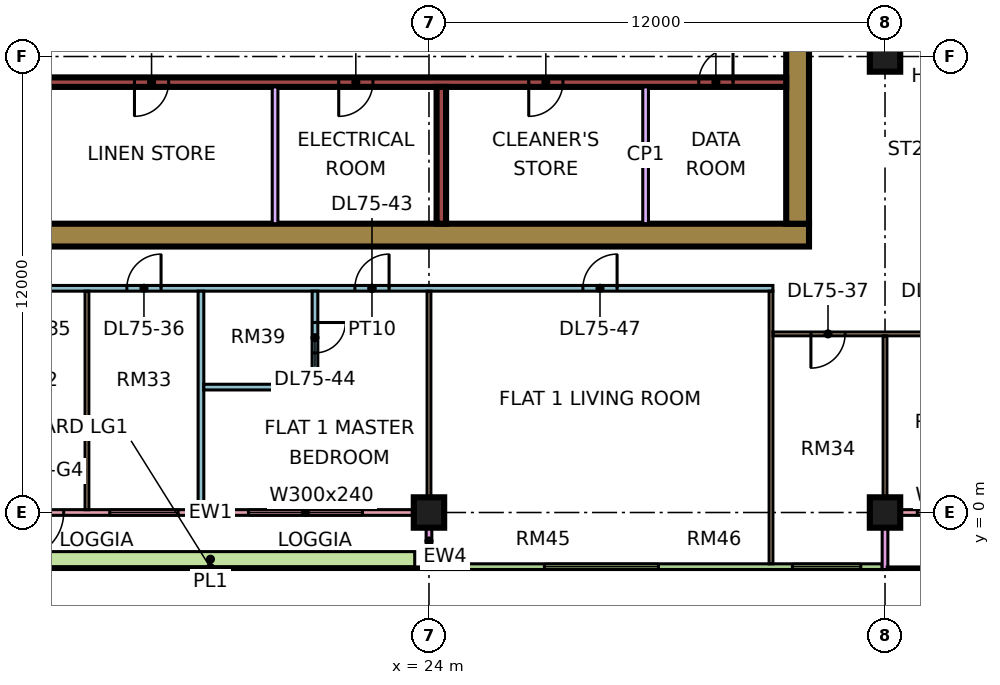
"""IFC4 building model, lengths in metres.
Left out: names, types, materials, properties, quantities, classifications, styles, units other than length and angle.
Written with IfcOpenShell. Run it as: python <this file> out.ifc"""

import sys

from ifc_helpers import new_model, si_unit, direction, frame, frame_2d, origin, origin_2d, place, context, subcontext, project, spatial, rectangle, extrude, element, fill, save


model = new_model("IFC4")
c1 = context("Model", 3, precision=1e-05, world=origin(), true_north=direction((0.0, 1.0)))
c2 = subcontext(c1, "Body", "Model", "MODEL_VIEW")
j1 = project(units=[si_unit("LENGTHUNIT", "METRE"), si_unit("PLANEANGLEUNIT", "RADIAN")], contexts=[c1])
p1 = place(None, origin())
s1 = spatial("IfcSite", under=j1, at=p1, CompositionType="ELEMENT")
p2 = place(p1, origin())
s2 = spatial("IfcBuilding", under=s1, at=p2, CompositionType="ELEMENT")
p3 = place(p2, frame((0.0, 0.0, 318.4)))
s3 = spatial("IfcBuildingStorey", under=s2, at=p3, CompositionType="ELEMENT", Elevation=318.4)
for number, where, z_axis, x_axis in (
    (1, (24.0, 0.0, 0.0), (0.0, 0.0, 1.0), (1.0, 0.0, 0.0)),
    (2, (36.0, 0.0, 0.0), (0.0, 0.0, 1.0), (1.0, 0.0, 0.0)),
    (3, (36.0, 12.0, 0.0), (0.0, 0.0, 1.0), (1.0, 0.0, 0.0)),
):
    element("IfcColumn", number, at=place(p3, frame(where, z_axis=z_axis, x_axis=x_axis)), inside=s3, PredefinedType="COLUMN", context=c2, shape_type="SweptSolid", body=[
        extrude(rectangle(XDim=0.8, YDim=0.8, at=origin_2d()), origin(), (0.0, 0.0, 1.0), 3.75),
    ])
p4 = place(p3, frame((9.0, 7.3, 0.0), z_axis=(0.0, 0.0, 1.0), x_axis=(1.0, 0.0, 0.0)))
e4 = element("IfcWall", 4, at=p4, inside=s3, PredefinedType="SHEAR", context=c2, shape_type="SweptSolid", body=[
    extrude(rectangle(XDim=25.0, YDim=0.6, at=frame_2d((12.5, 0.0))), origin(), (0.0, 0.0, 1.0), 3.75),
])
p5 = place(p3, frame((33.7, 7.6, 0.0), z_axis=(0.0, 0.0, 1.0), x_axis=(0.0, 1.0, 0.0)))
e5 = element("IfcWall", 5, at=p5, inside=s3, PredefinedType="SHEAR", context=c2, shape_type="SweptSolid", body=[
    extrude(rectangle(XDim=11.8, YDim=0.6, at=frame_2d((5.9, 0.0))), origin(), (0.0, 0.0, 1.0), 3.75),
])
p6 = place(p5, frame((5.6, 0.0, 0.0)))
e6 = element("IfcOpeningElement", 6, at=p6, cuts=e5, PredefinedType="OPENING", context=c2, shape_type="SweptSolid", body=[
    extrude(rectangle(XDim=1.8, YDim=2.4, at=frame_2d((0.9, 1.2))), frame((0.0, 0.31, 0.0), z_axis=(0.0, -1.0, 0.0), x_axis=(1.0, 0.0, 0.0)), (0.0, 0.0, 1.0), 0.62),
])
p7 = place(p3, frame((13.45, 11.325, 0.0), z_axis=(0.0, 0.0, 1.0), x_axis=(1.0, 0.0, 0.0)))
e7 = element("IfcWall", 7, at=p7, inside=s3, PredefinedType="SHEAR", context=c2, shape_type="SweptSolid", body=[
    extrude(rectangle(XDim=19.95, YDim=0.25, at=frame_2d((9.975, 0.0))), origin(), (0.0, 0.0, 1.0), 3.75),
])
p8 = place(p7, frame((2.8, 0.0, 0.0)))
e8 = element("IfcOpeningElement", 8, at=p8, cuts=e7, PredefinedType="OPENING", context=c2, shape_type="SweptSolid", body=[
    extrude(rectangle(XDim=0.9, YDim=2.1, at=frame_2d((0.45, 1.05))), frame((0.0, 0.135, 0.0), z_axis=(0.0, -1.0, 0.0), x_axis=(1.0, 0.0, 0.0)), (0.0, 0.0, 1.0), 0.27),
])
p9 = place(p7, frame((8.175, 0.0, 0.0)))
e9 = element("IfcOpeningElement", 9, at=p9, cuts=e7, PredefinedType="OPENING", context=c2, shape_type="SweptSolid", body=[
    extrude(rectangle(XDim=0.9, YDim=2.1, at=frame_2d((0.45, 1.05))), frame((0.0, 0.135, 0.0), z_axis=(0.0, -1.0, 0.0), x_axis=(1.0, 0.0, 0.0)), (0.0, 0.0, 1.0), 0.27),
])
p10 = place(p7, frame((13.175, 0.0, 0.0)))
e10 = element("IfcOpeningElement", 10, at=p10, cuts=e7, PredefinedType="OPENING", context=c2, shape_type="SweptSolid", body=[
    extrude(rectangle(XDim=0.9, YDim=2.1, at=frame_2d((0.45, 1.05))), frame((0.0, 0.135, 0.0), z_axis=(0.0, -1.0, 0.0), x_axis=(1.0, 0.0, 0.0)), (0.0, 0.0, 1.0), 0.27),
])
p11 = place(p7, frame((17.65, 0.0, 0.0)))
e11 = element("IfcOpeningElement", 11, at=p11, cuts=e7, PredefinedType="OPENING", context=c2, shape_type="SweptSolid", body=[
    extrude(rectangle(XDim=0.9, YDim=2.1, at=frame_2d((0.45, 1.05))), frame((0.0, 0.135, 0.0), z_axis=(0.0, -1.0, 0.0), x_axis=(1.0, 0.0, 0.0)), (0.0, 0.0, 1.0), 0.27),
])
p12 = place(p3, frame((24.325, 7.6, 0.0), z_axis=(0.0, 0.0, 1.0), x_axis=(0.0, 1.0, 0.0)))
e12 = element("IfcWall", 12, at=p12, inside=s3, PredefinedType="SHEAR", context=c2, shape_type="SweptSolid", body=[
    extrude(rectangle(XDim=3.6, YDim=0.25, at=frame_2d((1.8, 0.0))), origin(), (0.0, 0.0, 1.0), 3.75),
])
p13 = place(p3, frame((12.575, 0.0, 0.0), z_axis=(0.0, 0.0, 1.0), x_axis=(1.0, 0.0, 0.0)))
e13 = element("IfcWall", 13, at=p13, inside=s3, PredefinedType="SOLIDWALL", context=c2, shape_type="SweptSolid", body=[
    extrude(rectangle(XDim=11.35, YDim=0.15, at=frame_2d((5.675, 0.0))), origin(), (0.0, 0.0, 1.0), 3.3),
])
p14 = place(p13, frame((0.613, 0.0, 0.0)))
e14 = element("IfcOpeningElement", 14, at=p14, cuts=e13, PredefinedType="OPENING", context=c2, shape_type="SweptSolid", body=[
    extrude(rectangle(XDim=1.2, YDim=2.4, at=frame_2d((0.6, 1.2))), frame((0.0, 0.085, 0.0), z_axis=(0.0, -1.0, 0.0), x_axis=(1.0, 0.0, 0.0)), (0.0, 0.0, 1.0), 0.17),
])
p15 = place(p13, frame((3.025, 0.0, 0.45)))
e15 = element("IfcOpeningElement", 15, at=p15, cuts=e13, PredefinedType="OPENING", context=c2, shape_type="SweptSolid", body=[
    extrude(rectangle(XDim=1.8, YDim=2.4, at=frame_2d((0.9, 1.2))), frame((0.0, 0.085, 0.0), z_axis=(0.0, -1.0, 0.0), x_axis=(1.0, 0.0, 0.0)), (0.0, 0.0, 1.0), 0.17),
])
p16 = place(p13, frame((6.675, 0.0, 0.45)))
e16 = element("IfcOpeningElement", 16, at=p16, cuts=e13, PredefinedType="OPENING", context=c2, shape_type="SweptSolid", body=[
    extrude(rectangle(XDim=3.0, YDim=2.4, at=frame_2d((1.5, 1.2))), frame((0.0, 0.085, 0.0), z_axis=(0.0, -1.0, 0.0), x_axis=(1.0, 0.0, 0.0)), (0.0, 0.0, 1.0), 0.17),
])
p17 = place(p3, frame((24.0, -1.5, 0.0), z_axis=(0.0, 0.0, 1.0), x_axis=(0.0, 1.0, 0.0)))
e17 = element("IfcWall", 17, at=p17, inside=s3, PredefinedType="SOLIDWALL", context=c2, shape_type="SweptSolid", body=[
    extrude(rectangle(XDim=1.5, YDim=0.15, at=frame_2d((0.75, 0.0))), origin(), (0.0, 0.0, 1.0), 3.3),
])
p18 = place(p3, frame((24.075, -1.425, 0.0), z_axis=(0.0, 0.0, 1.0), x_axis=(1.0, 0.0, 0.0)))
e18 = element("IfcWall", 18, at=p18, inside=s3, PredefinedType="SOLIDWALL", context=c2, shape_type="SweptSolid", body=[
    extrude(rectangle(XDim=11.85, YDim=0.15, at=frame_2d((5.925, 0.0))), origin(), (0.0, 0.0, 1.0), 3.3),
])
p19 = place(p18, frame((2.962, 0.0, 0.45)))
e19 = element("IfcOpeningElement", 19, at=p19, cuts=e18, PredefinedType="OPENING", context=c2, shape_type="SweptSolid", body=[
    extrude(rectangle(XDim=3.0, YDim=2.4, at=frame_2d((1.5, 1.2))), frame((0.0, 0.085, 0.0), z_axis=(0.0, -1.0, 0.0), x_axis=(1.0, 0.0, 0.0)), (0.0, 0.0, 1.0), 0.17),
])
p20 = place(p18, frame((9.488, 0.0, 0.45)))
e20 = element("IfcOpeningElement", 20, at=p20, cuts=e18, PredefinedType="OPENING", context=c2, shape_type="SweptSolid", body=[
    extrude(rectangle(XDim=1.8, YDim=2.4, at=frame_2d((0.9, 1.2))), frame((0.0, 0.085, 0.0), z_axis=(0.0, -1.0, 0.0), x_axis=(1.0, 0.0, 0.0)), (0.0, 0.0, 1.0), 0.17),
])
p21 = place(p3, frame((36.075, 0.0, 0.0), z_axis=(0.0, 0.0, 1.0), x_axis=(1.0, 0.0, 0.0)))
e21 = element("IfcWall", 21, at=p21, inside=s3, PredefinedType="SOLIDWALL", context=c2, shape_type="SweptSolid", body=[
    extrude(rectangle(XDim=11.85, YDim=0.15, at=frame_2d((5.925, 0.0))), origin(), (0.0, 0.0, 1.0), 3.3),
])
p22 = place(p21, frame((0.775, 0.0, 0.45)))
e22 = element("IfcOpeningElement", 22, at=p22, cuts=e21, PredefinedType="OPENING", context=c2, shape_type="SweptSolid", body=[
    extrude(rectangle(XDim=1.8, YDim=2.4, at=frame_2d((0.9, 1.2))), frame((0.0, 0.085, 0.0), z_axis=(0.0, -1.0, 0.0), x_axis=(1.0, 0.0, 0.0)), (0.0, 0.0, 1.0), 0.17),
])
p23 = place(p21, frame((4.775, 0.0, 0.0)))
e23 = element("IfcOpeningElement", 23, at=p23, cuts=e21, PredefinedType="OPENING", context=c2, shape_type="SweptSolid", body=[
    extrude(rectangle(XDim=1.8, YDim=2.4, at=frame_2d((0.9, 1.2))), frame((0.0, 0.085, 0.0), z_axis=(0.0, -1.0, 0.0), x_axis=(1.0, 0.0, 0.0)), (0.0, 0.0, 1.0), 0.17),
])
p24 = place(p21, frame((10.038, 0.0, 0.45)))
e24 = element("IfcOpeningElement", 24, at=p24, cuts=e21, PredefinedType="OPENING", context=c2, shape_type="SweptSolid", body=[
    extrude(rectangle(XDim=1.2, YDim=2.4, at=frame_2d((0.6, 1.2))), frame((0.0, 0.085, 0.0), z_axis=(0.0, -1.0, 0.0), x_axis=(1.0, 0.0, 0.0)), (0.0, 0.0, 1.0), 0.17),
])
p25 = place(p3, frame((36.0, -1.5, 0.0), z_axis=(0.0, 0.0, 1.0), x_axis=(0.0, 1.0, 0.0)))
e25 = element("IfcWall", 25, at=p25, inside=s3, PredefinedType="SOLIDWALL", context=c2, shape_type="SweptSolid", body=[
    extrude(rectangle(XDim=1.5, YDim=0.15, at=frame_2d((0.75, 0.0))), origin(), (0.0, 0.0, 1.0), 3.3),
])
p26 = place(p3, frame((12.875, -1.229, 0.0), z_axis=(0.0, 0.0, 1.0), x_axis=(1.0, 0.0, 0.0)))
e26 = element("IfcWall", 26, at=p26, inside=s3, PredefinedType="SOLIDWALL", context=c2, shape_type="SweptSolid", body=[
    extrude(rectangle(XDim=10.75, YDim=0.4, at=frame_2d((5.375, 0.0))), origin(), (0.0, 0.0, 1.0), 0.7),
])
for number, where, z_axis, x_axis in (
    (27, (19.95, 7.6, 0.0), (0.0, 0.0, 1.0), (0.0, 1.0, 0.0)),
    (28, (29.7, 7.6, 0.0), (0.0, 0.0, 1.0), (0.0, 1.0, 0.0)),
):
    element("IfcWall", number, at=place(p3, frame(where, z_axis=z_axis, x_axis=x_axis)), inside=s3, PredefinedType="PARTITIONING", context=c2, shape_type="SweptSolid", body=[
        extrude(rectangle(XDim=3.6, YDim=0.15, at=frame_2d((1.8, 0.0))), origin(), (0.0, 0.0, 1.0), 3.3),
    ])
p27 = place(p3, frame((11.95, 5.9, 0.0), z_axis=(0.0, 0.0, 1.0), x_axis=(1.0, 0.0, 0.0)))
e29 = element("IfcWall", 29, at=p27, inside=s3, PredefinedType="PARTITIONING", context=c2, shape_type="SweptSolid", body=[
    extrude(rectangle(XDim=21.1, YDim=0.15, at=frame_2d((10.55, 0.0))), origin(), (0.0, 0.0, 1.0), 3.3),
])
p28 = place(p27, frame((1.1, 0.0, 0.0)))
e30 = element("IfcOpeningElement", 30, at=p28, cuts=e29, PredefinedType="OPENING", context=c2, shape_type="SweptSolid", body=[
    extrude(rectangle(XDim=0.9, YDim=2.1, at=frame_2d((0.45, 1.05))), frame((0.0, 0.085, 0.0), z_axis=(0.0, -1.0, 0.0), x_axis=(1.0, 0.0, 0.0)), (0.0, 0.0, 1.0), 0.17),
])
p29 = place(p27, frame((4.1, 0.0, 0.0)))
e31 = element("IfcOpeningElement", 31, at=p29, cuts=e29, PredefinedType="OPENING", context=c2, shape_type="SweptSolid", body=[
    extrude(rectangle(XDim=0.9, YDim=2.1, at=frame_2d((0.45, 1.05))), frame((0.0, 0.085, 0.0), z_axis=(0.0, -1.0, 0.0), x_axis=(1.0, 0.0, 0.0)), (0.0, 0.0, 1.0), 0.17),
])
p30 = place(p27, frame((10.1, 0.0, 0.0)))
e32 = element("IfcOpeningElement", 32, at=p30, cuts=e29, PredefinedType="OPENING", context=c2, shape_type="SweptSolid", body=[
    extrude(rectangle(XDim=0.9, YDim=2.1, at=frame_2d((0.45, 1.05))), frame((0.0, 0.085, 0.0), z_axis=(0.0, -1.0, 0.0), x_axis=(1.0, 0.0, 0.0)), (0.0, 0.0, 1.0), 0.17),
])
p31 = place(p27, frame((16.1, 0.0, 0.0)))
e33 = element("IfcOpeningElement", 33, at=p31, cuts=e29, PredefinedType="OPENING", context=c2, shape_type="SweptSolid", body=[
    extrude(rectangle(XDim=0.9, YDim=2.1, at=frame_2d((0.45, 1.05))), frame((0.0, 0.085, 0.0), z_axis=(0.0, -1.0, 0.0), x_axis=(1.0, 0.0, 0.0)), (0.0, 0.0, 1.0), 0.17),
])
p32 = place(p3, frame((15.0, 0.074, 0.0), z_axis=(0.0, 0.0, 1.0), x_axis=(0.0, 1.0, 0.0)))
e34 = element("IfcWall", 34, at=p32, inside=s3, PredefinedType="PARTITIONING", context=c2, shape_type="SweptSolid", body=[
    extrude(rectangle(XDim=5.751, YDim=0.1, at=frame_2d((2.875, 0.0))), origin(), (0.0, 0.0, 1.0), 3.3),
])
p33 = place(p3, frame((18.0, 0.074, 0.0), z_axis=(0.0, 0.0, 1.0), x_axis=(0.0, 1.0, 0.0)))
e35 = element("IfcWall", 35, at=p33, inside=s3, PredefinedType="PARTITIONING", context=c2, shape_type="SweptSolid", body=[
    extrude(rectangle(XDim=5.751, YDim=0.15, at=frame_2d((2.875, 0.0))), origin(), (0.0, 0.0, 1.0), 3.3),
])
p34 = place(p3, frame((18.075, 3.3, 0.0), z_axis=(0.0, 0.0, 1.0), x_axis=(1.0, 0.0, 0.0)))
e36 = element("IfcWall", 36, at=p34, inside=s3, PredefinedType="PARTITIONING", context=c2, shape_type="SweptSolid", body=[
    extrude(rectangle(XDim=3.0, YDim=0.15, at=frame_2d((1.5, 0.0))), origin(), (0.0, 0.0, 1.0), 3.3),
])
p35 = place(p3, frame((21.0, 3.375, 0.0), z_axis=(0.0, 0.0, 1.0), x_axis=(0.0, 1.0, 0.0)))
e37 = element("IfcWall", 37, at=p35, inside=s3, PredefinedType="PARTITIONING", context=c2, shape_type="SweptSolid", body=[
    extrude(rectangle(XDim=2.45, YDim=0.15, at=frame_2d((1.225, 0.0))), origin(), (0.0, 0.0, 1.0), 3.3),
])
p36 = place(p35, frame((0.825, 0.0, 0.0)))
e38 = element("IfcOpeningElement", 38, at=p36, cuts=e37, PredefinedType="OPENING", context=c2, shape_type="SweptSolid", body=[
    extrude(rectangle(XDim=0.8, YDim=2.1, at=frame_2d((0.4, 1.05))), frame((0.0, 0.085, 0.0), z_axis=(0.0, -1.0, 0.0), x_axis=(1.0, 0.0, 0.0)), (0.0, 0.0, 1.0), 0.17),
])
p37 = place(p3, frame((24.0, 0.0, 0.0), z_axis=(0.0, 0.0, 1.0), x_axis=(0.0, 1.0, 0.0)))
e39 = element("IfcWall", 39, at=p37, inside=s3, PredefinedType="PARTITIONING", context=c2, shape_type="SweptSolid", body=[
    extrude(rectangle(XDim=5.825, YDim=0.1, at=frame_2d((2.913, 0.0))), origin(), (0.0, 0.0, 1.0), 3.3),
])
p38 = place(p3, frame((33.0, -1.35, 0.0), z_axis=(0.0, 0.0, 1.0), x_axis=(0.0, 1.0, 0.0)))
e40 = element("IfcWall", 40, at=p38, inside=s3, PredefinedType="PARTITIONING", context=c2, shape_type="SweptSolid", body=[
    extrude(rectangle(XDim=7.175, YDim=0.1, at=frame_2d((3.587, 0.0))), origin(), (0.0, 0.0, 1.0), 3.3),
])
p39 = place(p3, frame((33.05, 4.7, 0.0), z_axis=(0.0, 0.0, 1.0), x_axis=(1.0, 0.0, 0.0)))
e41 = element("IfcWall", 41, at=p39, inside=s3, PredefinedType="PARTITIONING", context=c2, shape_type="SweptSolid", body=[
    extrude(rectangle(XDim=20.85, YDim=0.1, at=frame_2d((10.425, 0.0))), origin(), (0.0, 0.0, 1.0), 3.3),
])
p40 = place(p39, frame((1.0, 0.0, 0.0)))
e42 = element("IfcOpeningElement", 42, at=p40, cuts=e41, PredefinedType="OPENING", context=c2, shape_type="SweptSolid", body=[
    extrude(rectangle(XDim=0.9, YDim=2.1, at=frame_2d((0.45, 1.05))), frame((0.0, 0.06, 0.0), z_axis=(0.0, -1.0, 0.0), x_axis=(1.0, 0.0, 0.0)), (0.0, 0.0, 1.0), 0.12),
])
p41 = place(p39, frame((4.0, 0.0, 0.0)))
e43 = element("IfcOpeningElement", 43, at=p41, cuts=e41, PredefinedType="OPENING", context=c2, shape_type="SweptSolid", body=[
    extrude(rectangle(XDim=0.9, YDim=2.1, at=frame_2d((0.45, 1.05))), frame((0.0, 0.06, 0.0), z_axis=(0.0, -1.0, 0.0), x_axis=(1.0, 0.0, 0.0)), (0.0, 0.0, 1.0), 0.12),
])
p42 = place(p39, frame((16.0, 0.0, 0.0)))
e44 = element("IfcOpeningElement", 44, at=p42, cuts=e41, PredefinedType="OPENING", context=c2, shape_type="SweptSolid", body=[
    extrude(rectangle(XDim=0.9, YDim=2.1, at=frame_2d((0.45, 1.05))), frame((0.0, 0.06, 0.0), z_axis=(0.0, -1.0, 0.0), x_axis=(1.0, 0.0, 0.0)), (0.0, 0.0, 1.0), 0.12),
])
p43 = place(p39, frame((19.0, 0.0, 0.0)))
e45 = element("IfcOpeningElement", 45, at=p43, cuts=e41, PredefinedType="OPENING", context=c2, shape_type="SweptSolid", body=[
    extrude(rectangle(XDim=0.9, YDim=2.1, at=frame_2d((0.45, 1.05))), frame((0.0, 0.06, 0.0), z_axis=(0.0, -1.0, 0.0), x_axis=(1.0, 0.0, 0.0)), (0.0, 0.0, 1.0), 0.12),
])
p44 = place(p39, frame((10.0, 0.0, 0.0)))
e46 = element("IfcOpeningElement", 46, at=p44, cuts=e41, PredefinedType="OPENING", context=c2, shape_type="SweptSolid", body=[
    extrude(rectangle(XDim=0.9, YDim=2.1, at=frame_2d((0.45, 1.05))), frame((0.0, 0.06, 0.0), z_axis=(0.0, -1.0, 0.0), x_axis=(1.0, 0.0, 0.0)), (0.0, 0.0, 1.0), 0.12),
])
p45 = place(p3, frame((36.0, 0.0, 0.0), z_axis=(0.0, 0.0, 1.0), x_axis=(0.0, 1.0, 0.0)))
e47 = element("IfcWall", 47, at=p45, inside=s3, PredefinedType="PARTITIONING", context=c2, shape_type="SweptSolid", body=[
    extrude(rectangle(XDim=4.65, YDim=0.1, at=frame_2d((2.325, 0.0))), origin(), (0.0, 0.0, 1.0), 3.3),
])
p46 = place(p14, frame((1.2, 0.0, 0.0), z_axis=(0.0, 0.0, 1.0), x_axis=(-1.0, 0.0, 0.0)))
e48 = element("IfcDoor", 48, at=p46, inside=s3, OperationType="DOUBLE_DOOR_SINGLE_SWING", PredefinedType="DOOR", context=c2, shape_type="SweptSolid", body=[
    extrude(rectangle(XDim=1.2, YDim=2.4, at=frame_2d((0.6, 1.2))), frame((0.0, 0.025, 0.0), z_axis=(0.0, -1.0, 0.0), x_axis=(1.0, 0.0, 0.0)), (0.0, 0.0, 1.0), 0.05),
])
fill(e14, e48)
p47 = place(p15, origin())
e49 = element("IfcWindow", 49, at=p47, inside=s3, PartitioningType="SINGLE_PANEL", PredefinedType="WINDOW", context=c2, shape_type="SweptSolid", body=[
    extrude(rectangle(XDim=1.8, YDim=2.4, at=frame_2d((0.9, 1.2))), frame((0.0, 0.03, 0.0), z_axis=(0.0, -1.0, 0.0), x_axis=(1.0, 0.0, 0.0)), (0.0, 0.0, 1.0), 0.06),
])
fill(e15, e49)
p48 = place(p16, origin())
e50 = element("IfcWindow", 50, at=p48, inside=s3, PartitioningType="SINGLE_PANEL", PredefinedType="WINDOW", context=c2, shape_type="SweptSolid", body=[
    extrude(rectangle(XDim=3.0, YDim=2.4, at=frame_2d((1.5, 1.2))), frame((0.0, 0.03, 0.0), z_axis=(0.0, -1.0, 0.0), x_axis=(1.0, 0.0, 0.0)), (0.0, 0.0, 1.0), 0.06),
])
fill(e16, e50)
p49 = place(p19, origin())
e51 = element("IfcWindow", 51, at=p49, inside=s3, PartitioningType="SINGLE_PANEL", PredefinedType="WINDOW", context=c2, shape_type="SweptSolid", body=[
    extrude(rectangle(XDim=3.0, YDim=2.4, at=frame_2d((1.5, 1.2))), frame((0.0, 0.03, 0.0), z_axis=(0.0, -1.0, 0.0), x_axis=(1.0, 0.0, 0.0)), (0.0, 0.0, 1.0), 0.06),
])
fill(e19, e51)
p50 = place(p20, origin())
e52 = element("IfcWindow", 52, at=p50, inside=s3, PartitioningType="SINGLE_PANEL", PredefinedType="WINDOW", context=c2, shape_type="SweptSolid", body=[
    extrude(rectangle(XDim=1.8, YDim=2.4, at=frame_2d((0.9, 1.2))), frame((0.0, 0.03, 0.0), z_axis=(0.0, -1.0, 0.0), x_axis=(1.0, 0.0, 0.0)), (0.0, 0.0, 1.0), 0.06),
])
fill(e20, e52)
p51 = place(p22, origin())
e53 = element("IfcWindow", 53, at=p51, inside=s3, PartitioningType="SINGLE_PANEL", PredefinedType="WINDOW", context=c2, shape_type="SweptSolid", body=[
    extrude(rectangle(XDim=1.8, YDim=2.4, at=frame_2d((0.9, 1.2))), frame((0.0, 0.03, 0.0), z_axis=(0.0, -1.0, 0.0), x_axis=(1.0, 0.0, 0.0)), (0.0, 0.0, 1.0), 0.06),
])
fill(e22, e53)
p52 = place(p8, frame((0.9, 0.0, 0.0), z_axis=(0.0, 0.0, 1.0), x_axis=(-1.0, 0.0, 0.0)))
e54 = element("IfcDoor", 54, at=p52, inside=s3, OperationType="SINGLE_SWING_LEFT", PredefinedType="DOOR", context=c2, shape_type="SweptSolid", body=[
    extrude(rectangle(XDim=0.9, YDim=2.1, at=frame_2d((0.45, 1.05))), frame((0.0, 0.025, 0.0), z_axis=(0.0, -1.0, 0.0), x_axis=(1.0, 0.0, 0.0)), (0.0, 0.0, 1.0), 0.05),
])
fill(e8, e54)
p53 = place(p9, frame((0.9, 0.0, 0.0), z_axis=(0.0, 0.0, 1.0), x_axis=(-1.0, 0.0, 0.0)))
e55 = element("IfcDoor", 55, at=p53, inside=s3, OperationType="SINGLE_SWING_LEFT", PredefinedType="DOOR", context=c2, shape_type="SweptSolid", body=[
    extrude(rectangle(XDim=0.9, YDim=2.1, at=frame_2d((0.45, 1.05))), frame((0.0, 0.025, 0.0), z_axis=(0.0, -1.0, 0.0), x_axis=(1.0, 0.0, 0.0)), (0.0, 0.0, 1.0), 0.05),
])
fill(e9, e55)
p54 = place(p10, frame((0.9, 0.0, 0.0), z_axis=(0.0, 0.0, 1.0), x_axis=(-1.0, 0.0, 0.0)))
e56 = element("IfcDoor", 56, at=p54, inside=s3, OperationType="SINGLE_SWING_LEFT", PredefinedType="DOOR", context=c2, shape_type="SweptSolid", body=[
    extrude(rectangle(XDim=0.9, YDim=2.1, at=frame_2d((0.45, 1.05))), frame((0.0, 0.025, 0.0), z_axis=(0.0, -1.0, 0.0), x_axis=(1.0, 0.0, 0.0)), (0.0, 0.0, 1.0), 0.05),
])
fill(e10, e56)
p55 = place(p11, frame((0.9, 0.0, 0.0), z_axis=(0.0, 0.0, 1.0), x_axis=(-1.0, 0.0, 0.0)))
e57 = element("IfcDoor", 57, at=p55, inside=s3, OperationType="SINGLE_SWING_RIGHT", PredefinedType="DOOR", context=c2, shape_type="SweptSolid", body=[
    extrude(rectangle(XDim=0.9, YDim=2.1, at=frame_2d((0.45, 1.05))), frame((0.0, 0.025, 0.0), z_axis=(0.0, -1.0, 0.0), x_axis=(1.0, 0.0, 0.0)), (0.0, 0.0, 1.0), 0.05),
])
fill(e11, e57)
p56 = place(p29, frame((0.9, 0.0, 0.0), z_axis=(0.0, 0.0, 1.0), x_axis=(-1.0, 0.0, 0.0)))
e58 = element("IfcDoor", 58, at=p56, inside=s3, OperationType="SINGLE_SWING_RIGHT", PredefinedType="DOOR", context=c2, shape_type="SweptSolid", body=[
    extrude(rectangle(XDim=0.9, YDim=2.1, at=frame_2d((0.45, 1.05))), frame((0.0, 0.025, 0.0), z_axis=(0.0, -1.0, 0.0), x_axis=(1.0, 0.0, 0.0)), (0.0, 0.0, 1.0), 0.05),
])
fill(e31, e58)
p57 = place(p40, frame((0.9, 0.0, 0.0), z_axis=(0.0, 0.0, 1.0), x_axis=(-1.0, 0.0, 0.0)))
e59 = element("IfcDoor", 59, at=p57, inside=s3, OperationType="SINGLE_SWING_LEFT", PredefinedType="DOOR", context=c2, shape_type="SweptSolid", body=[
    extrude(rectangle(XDim=0.9, YDim=2.1, at=frame_2d((0.45, 1.05))), frame((0.0, 0.025, 0.0), z_axis=(0.0, -1.0, 0.0), x_axis=(1.0, 0.0, 0.0)), (0.0, 0.0, 1.0), 0.05),
])
fill(e42, e59)
p58 = place(p30, frame((0.9, 0.0, 0.0), z_axis=(0.0, 0.0, 1.0), x_axis=(-1.0, 0.0, 0.0)))
e60 = element("IfcDoor", 60, at=p58, inside=s3, OperationType="SINGLE_SWING_RIGHT", PredefinedType="DOOR", context=c2, shape_type="SweptSolid", body=[
    extrude(rectangle(XDim=0.9, YDim=2.1, at=frame_2d((0.45, 1.05))), frame((0.0, 0.025, 0.0), z_axis=(0.0, -1.0, 0.0), x_axis=(1.0, 0.0, 0.0)), (0.0, 0.0, 1.0), 0.05),
])
fill(e32, e60)
p59 = place(p36, origin())
e61 = element("IfcDoor", 61, at=p59, inside=s3, OperationType="SINGLE_SWING_RIGHT", PredefinedType="DOOR", context=c2, shape_type="SweptSolid", body=[
    extrude(rectangle(XDim=0.8, YDim=2.1, at=frame_2d((0.4, 1.05))), frame((0.0, 0.025, 0.0), z_axis=(0.0, -1.0, 0.0), x_axis=(1.0, 0.0, 0.0)), (0.0, 0.0, 1.0), 0.05),
])
fill(e38, e61)
p60 = place(p31, frame((0.9, 0.0, 0.0), z_axis=(0.0, 0.0, 1.0), x_axis=(-1.0, 0.0, 0.0)))
e62 = element("IfcDoor", 62, at=p60, inside=s3, OperationType="SINGLE_SWING_RIGHT", PredefinedType="DOOR", context=c2, shape_type="SweptSolid", body=[
    extrude(rectangle(XDim=0.9, YDim=2.1, at=frame_2d((0.45, 1.05))), frame((0.0, 0.025, 0.0), z_axis=(0.0, -1.0, 0.0), x_axis=(1.0, 0.0, 0.0)), (0.0, 0.0, 1.0), 0.05),
])
fill(e33, e62)
save(model, sys.argv[1])
